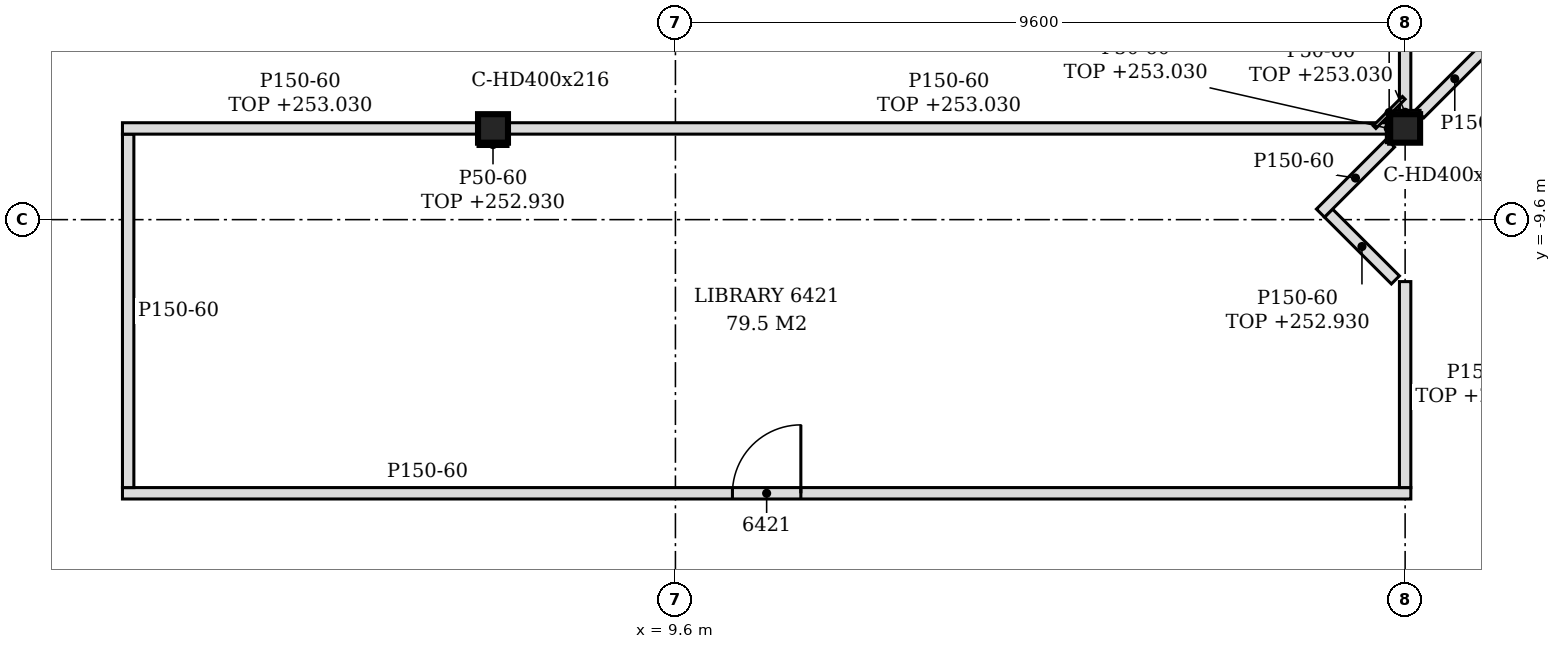
"""IFC4 building model, lengths in metres.
Left out: names, types, materials, properties, quantities, classifications, styles, units other than length and angle.
Written with IfcOpenShell. Run it as: python <this file> out.ifc"""

import sys

from ifc_helpers import new_model, si_unit, direction, frame, frame_2d, origin, origin_2d, place, context, subcontext, project, spatial, polyline, rectangle, i_section, outline, extrude, element, fill, save


model = new_model("IFC4")
c1 = context("Model", 3, precision=1e-05, world=origin(), true_north=direction((0.0, 1.0)))
c2 = subcontext(c1, "Body", "Model", "MODEL_VIEW")
j1 = project(units=[si_unit("LENGTHUNIT", "METRE"), si_unit("PLANEANGLEUNIT", "RADIAN")], contexts=[c1])
p1 = place(None, origin())
s1 = spatial("IfcSite", under=j1, at=p1, CompositionType="ELEMENT")
p2 = place(p1, origin())
s2 = spatial("IfcBuilding", under=s1, at=p2, CompositionType="ELEMENT")
p3 = place(p2, frame((0.0, 0.0, 250.2)))
s3 = spatial("IfcBuildingStorey", under=s2, at=p3, CompositionType="ELEMENT", Elevation=250.2)
for number, where, z_axis, x_axis in (
    (1, (7.2, -8.4, -0.15), (0.0, 0.0, 1.0), (1.0, 0.0, 0.0)),
    (2, (19.2, -8.4, -0.15), (0.0, 0.0, 1.0), (1.0, 0.0, 0.0)),
):
    element("IfcColumn", number, at=place(p3, frame(where, z_axis=z_axis, x_axis=x_axis)), inside=s3, PredefinedType="COLUMN", context=c2, shape_type="SweptSolid", body=[
        extrude(i_section(OverallWidth=0.394, OverallDepth=0.375, WebThickness=0.017, FlangeThickness=0.028, FilletRadius=0.015, at=origin_2d()), origin(), (0.0, 0.0, 1.0), 3.6),
    ])
p4 = place(p3, frame((2.325, -13.2, 0.0), z_axis=(0.0, 0.0, 1.0), x_axis=(1.0, 0.0, 0.0)))
e3 = element("IfcWall", 3, at=p4, inside=s3, PredefinedType="PARTITIONING", context=c2, shape_type="SweptSolid", body=[
    extrude(outline(polyline([(0.0, 0.0), (16.95, 0.0), (16.95, 2.73), (16.725, 2.73), (16.723, 3.45), (5.025, 3.45), (5.023, 2.73), (4.725, 2.73), (4.723, 3.45), (0.0, 3.45), (0.0, 0.0)])), frame((0.0, 0.075, 0.0), z_axis=(0.0, -1.0, 0.0), x_axis=(1.0, 0.0, 0.0)), (0.0, 0.0, 1.0), 0.15),
])
p5 = place(p4, frame((8.025, 0.0, 0.0)))
e4 = element("IfcOpeningElement", 4, at=p5, cuts=e3, PredefinedType="OPENING", context=c2, shape_type="SweptSolid", body=[
    extrude(rectangle(XDim=0.9, YDim=2.1, at=frame_2d((0.45, 1.05))), frame((0.0, 0.085, 0.0), z_axis=(0.0, -1.0, 0.0), x_axis=(1.0, 0.0, 0.0)), (0.0, 0.0, 1.0), 0.17),
])
p6 = place(p3, frame((2.4, -13.125, 0.0), z_axis=(0.0, 0.0, 1.0), x_axis=(0.0, 1.0, 0.0)))
e5 = element("IfcWall", 5, at=p6, inside=s3, PredefinedType="PARTITIONING", context=c2, shape_type="SweptSolid", body=[
    extrude(outline(polyline([(0.0, 0.0), (4.65, 0.0), (4.65, 2.83), (4.575, 2.83), (4.573, 3.45), (0.0, 3.45), (0.0, 0.0)])), frame((0.0, 0.075, 0.0), z_axis=(0.0, -1.0, 0.0), x_axis=(1.0, 0.0, 0.0)), (0.0, 0.0, 1.0), 0.15),
])
p7 = place(p3, frame((19.2, -13.125, 0.0), z_axis=(0.0, 0.0, 1.0), x_axis=(0.0, 1.0, 0.0)))
e6 = element("IfcWall", 6, at=p7, inside=s3, PredefinedType="PARTITIONING", context=c2, shape_type="SweptSolid", body=[
    extrude(rectangle(XDim=2.71, YDim=0.15, at=frame_2d((1.355, 0.0))), origin(), (0.0, 0.0, 1.0), 2.73),
])
p8 = place(p3, frame((19.072, -10.393, 0.0), z_axis=(0.0, 0.0, 1.0), x_axis=(-0.70740114323, 0.706812296552, 0.0)))
e7 = element("IfcWall", 7, at=p8, inside=s3, PredefinedType="PARTITIONING", context=c2, shape_type="SweptSolid", body=[
    extrude(rectangle(XDim=1.244, YDim=0.15, at=frame_2d((0.622, 0.0))), origin(), (0.0, 0.0, 1.0), 2.73),
])
p9 = place(p3, frame((18.086, -9.514, 0.0), z_axis=(0.0, 0.0, 1.0), x_axis=(0.707200419109, 0.707013130862, 0.0)))
e8 = element("IfcWall", 8, at=p9, inside=s3, PredefinedType="PARTITIONING", context=c2, shape_type="SweptSolid", body=[
    extrude(rectangle(XDim=1.303, YDim=0.15, at=frame_2d((0.652, 0.0))), origin(), (0.0, 0.0, 1.0), 3.45),
])
p10 = place(p3, frame((2.325, -8.4, 0.0), z_axis=(0.0, 0.0, 1.0), x_axis=(1.0, 0.0, 0.0)))
e9 = element("IfcWall", 9, at=p10, inside=s3, PredefinedType="PARTITIONING", context=c2, shape_type="SweptSolid", body=[
    extrude(rectangle(XDim=4.678, YDim=0.15, at=frame_2d((2.339, 0.0))), origin(), (0.0, 0.0, 1.0), 2.83),
])
p11 = place(p3, frame((7.397, -8.4, 0.0), z_axis=(0.0, 0.0, 1.0), x_axis=(1.0, 0.0, 0.0)))
e10 = element("IfcWall", 10, at=p11, inside=s3, PredefinedType="PARTITIONING", context=c2, shape_type="SweptSolid", body=[
    extrude(rectangle(XDim=11.606, YDim=0.15, at=frame_2d((5.803, 0.0))), origin(), (0.0, 0.0, 1.0), 2.83),
])
p12 = place(p3, frame((19.2, -8.212, 0.0), z_axis=(0.0, 0.0, 1.0), x_axis=(0.0, 1.0, 0.0)))
e11 = element("IfcWall", 11, at=p12, inside=s3, PredefinedType="PARTITIONING", context=c2, shape_type="SweptSolid", body=[
    extrude(rectangle(XDim=9.337, YDim=0.15, at=frame_2d((4.669, 0.0))), origin(), (0.0, 0.0, 1.0), 2.83),
])
p13 = place(p3, frame((19.392, -8.208, 0.0), z_axis=(0.0, 0.0, 1.0), x_axis=(0.707106781187, 0.707106781187, 0.0)))
e12 = element("IfcWall", 12, at=p13, inside=s3, PredefinedType="PARTITIONING", context=c2, shape_type="SweptSolid", body=[
    extrude(rectangle(XDim=1.304, YDim=0.15, at=frame_2d((0.652, 0.0))), origin(), (0.0, 0.0, 1.0), 3.45),
])
p14 = place(p3, frame((18.798, -8.382, 0.0), z_axis=(0.0, 0.0, 1.0), x_axis=(0.707106781187, 0.707106781187, 0.0)))
e13 = element("IfcWall", 13, at=p14, inside=s3, PredefinedType="PARTITIONING", context=c2, shape_type="SweptSolid", body=[
    extrude(rectangle(XDim=0.544, YDim=0.05, at=frame_2d((0.272, 0.0))), origin(), (0.0, 0.0, 1.0), 2.83),
])
p15 = place(p3, frame((7.003, -8.613, 0.0), z_axis=(0.0, 0.0, 1.0), x_axis=(1.0, 0.0, 0.0)))
e14 = element("IfcWall", 14, at=p15, inside=s3, PredefinedType="PARTITIONING", context=c2, shape_type="SweptSolid", body=[
    extrude(rectangle(XDim=0.394, YDim=0.05, at=frame_2d((0.197, 0.0))), origin(), (0.0, 0.0, 1.0), 2.73),
])
p16 = place(p3, frame((19.003, -8.188, 0.0), z_axis=(0.0, 0.0, 1.0), x_axis=(1.0, 0.0, 0.0)))
e15 = element("IfcWall", 15, at=p16, inside=s3, PredefinedType="PARTITIONING", context=c2, shape_type="SweptSolid", body=[
    extrude(rectangle(XDim=0.394, YDim=0.05, at=frame_2d((0.197, 0.0))), origin(), (0.0, 0.0, 1.0), 2.83),
])
p17 = place(p3, frame((18.978, -8.587, 0.0), z_axis=(0.0, 0.0, 1.0), x_axis=(0.0, 1.0, 0.0)))
e16 = element("IfcWall", 16, at=p17, inside=s3, PredefinedType="PARTITIONING", context=c2, shape_type="SweptSolid", body=[
    extrude(rectangle(XDim=0.375, YDim=0.05, at=frame_2d((0.188, 0.0))), origin(), (0.0, 0.0, 1.0), 2.83),
])
p18 = place(p5, origin())
e17 = element("IfcDoor", 17, at=p18, inside=s3, OperationType="SINGLE_SWING_RIGHT", PredefinedType="DOOR", context=c2, shape_type="SweptSolid", body=[
    extrude(rectangle(XDim=0.9, YDim=2.1, at=frame_2d((0.45, 1.05))), frame((0.0, 0.025, 0.0), z_axis=(0.0, -1.0, 0.0), x_axis=(1.0, 0.0, 0.0)), (0.0, 0.0, 1.0), 0.05),
])
fill(e4, e17)
save(model, sys.argv[1])
